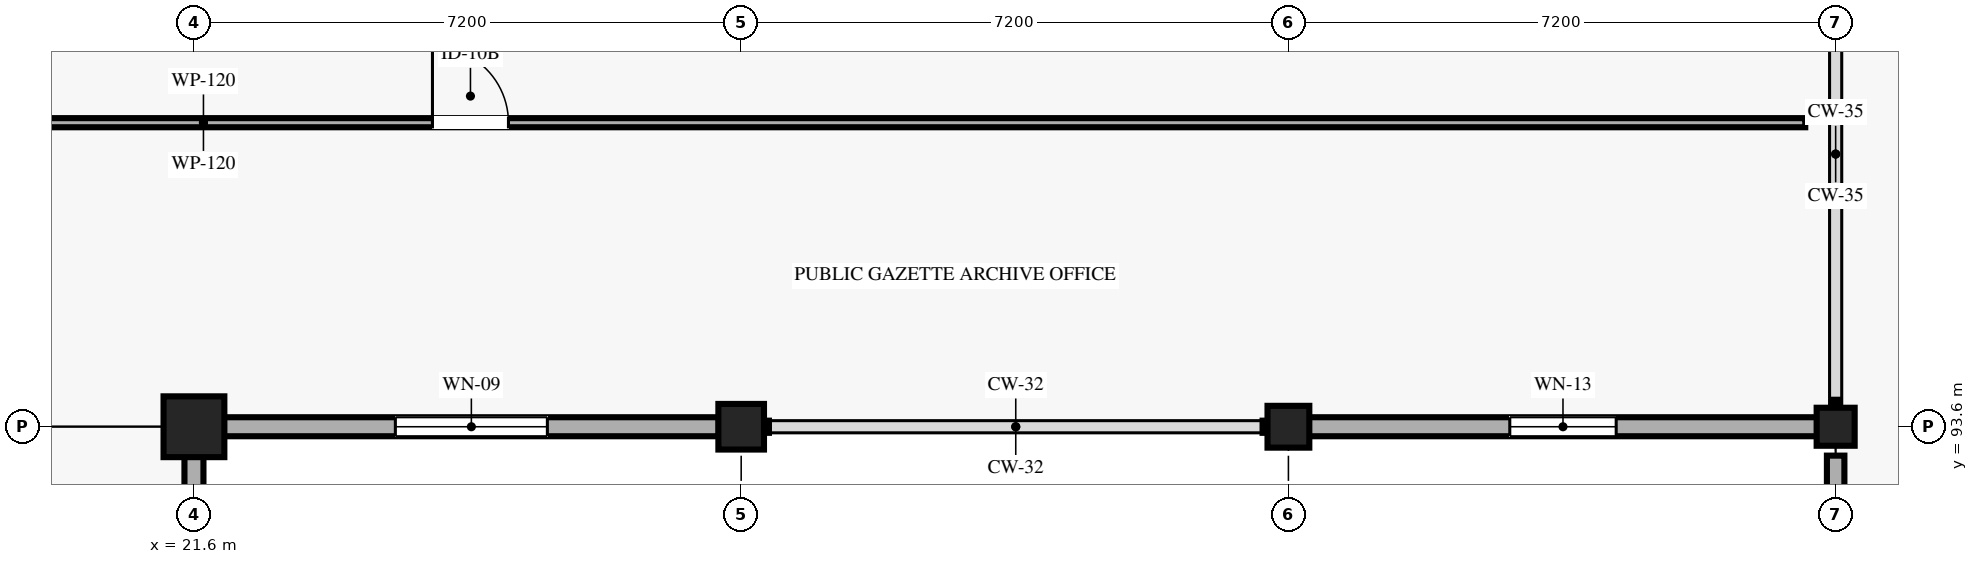
"""IFC4 building model, lengths in metres.
Left out: names, types, materials, properties, quantities, classifications, styles, units other than length and angle.
Written with IfcOpenShell. Run it as: python <this file> out.ifc"""

import sys

from ifc_helpers import new_model, si_unit, direction, frame, frame_2d, origin, origin_2d, place, context, subcontext, project, spatial, rectangle, extrude, element, fill, save


model = new_model("IFC4")
c1 = context("Model", 3, precision=1e-05, world=origin(), true_north=direction((0.0, 1.0)))
c2 = subcontext(c1, "Body", "Model", "MODEL_VIEW")
j1 = project(units=[si_unit("LENGTHUNIT", "METRE"), si_unit("PLANEANGLEUNIT", "RADIAN")], contexts=[c1])
p1 = place(None, origin())
s1 = spatial("IfcSite", under=j1, at=p1, CompositionType="ELEMENT")
p2 = place(p1, origin())
s2 = spatial("IfcBuilding", under=s1, at=p2, CompositionType="ELEMENT")
p3 = place(p2, frame((0.0, 0.0, 9.45)))
s3 = spatial("IfcBuildingStorey", under=s2, at=p3, CompositionType="ELEMENT", Elevation=9.45)
p4 = place(p3, frame((21.6, 93.6, 0.0), z_axis=(0.0, 0.0, 1.0), x_axis=(1.0, 0.0, 0.0)))
e1 = element("IfcColumn", 1, at=p4, inside=s3, PredefinedType="COLUMN", context=c2, shape_type="SweptSolid", body=[
    extrude(rectangle(XDim=0.8, YDim=0.8, at=origin_2d()), origin(), (0.0, 0.0, 1.0), 4.05),
])
p5 = place(p3, frame((28.8, 93.6, 0.0), z_axis=(0.0, 0.0, 1.0), x_axis=(1.0, 0.0, 0.0)))
e2 = element("IfcColumn", 2, at=p5, inside=s3, PredefinedType="COLUMN", context=c2, shape_type="SweptSolid", body=[
    extrude(rectangle(XDim=0.6, YDim=0.6, at=origin_2d()), origin(), (0.0, 0.0, 1.0), 4.05),
])
p6 = place(p3, frame((36.0, 93.6, 0.0), z_axis=(0.0, 0.0, 1.0), x_axis=(1.0, 0.0, 0.0)))
e3 = element("IfcColumn", 3, at=p6, inside=s3, PredefinedType="COLUMN", context=c2, shape_type="SweptSolid", body=[
    extrude(rectangle(XDim=0.55, YDim=0.55, at=origin_2d()), origin(), (0.0, 0.0, 1.0), 4.05),
])
p7 = place(p3, frame((43.2, 93.6, 0.0), z_axis=(0.0, 0.0, 1.0), x_axis=(1.0, 0.0, 0.0)))
e4 = element("IfcColumn", 4, at=p7, inside=s3, PredefinedType="COLUMN", context=c2, shape_type="SweptSolid", body=[
    extrude(rectangle(XDim=0.5, YDim=0.5, at=origin_2d()), origin(), (0.0, 0.0, 1.0), 4.05),
])
p8 = place(p3, frame((21.995, 93.6, 0.0), z_axis=(0.0, 0.0, 1.0), x_axis=(1.0, 0.0, 0.0)))
e5 = element("IfcWall", 5, at=p8, inside=s3, PredefinedType="SOLIDWALL", context=c2, shape_type="SweptSolid", body=[
    extrude(rectangle(XDim=6.51, YDim=0.25, at=frame_2d((3.255, 0.0))), origin(), (0.0, 0.0, 1.0), 3.195),
])
p9 = place(p8, frame((2.255, 0.0, 0.85)))
e6 = element("IfcOpeningElement", 6, at=p9, cuts=e5, PredefinedType="OPENING", context=c2, shape_type="SweptSolid", body=[
    extrude(rectangle(XDim=2.0, YDim=1.65, at=frame_2d((1.0, 0.825))), frame((0.0, 0.135, 0.0), z_axis=(0.0, -1.0, 0.0), x_axis=(1.0, 0.0, 0.0)), (0.0, 0.0, 1.0), 0.27),
])
p10 = place(p3, frame((36.27, 93.6, 0.0), z_axis=(0.0, 0.0, 1.0), x_axis=(1.0, 0.0, 0.0)))
e7 = element("IfcWall", 7, at=p10, inside=s3, PredefinedType="SOLIDWALL", context=c2, shape_type="SweptSolid", body=[
    extrude(rectangle(XDim=6.685, YDim=0.25, at=frame_2d((3.343, 0.0))), origin(), (0.0, 0.0, 1.0), 3.195),
])
p11 = place(p10, frame((2.643, 0.0, 0.85)))
e8 = element("IfcOpeningElement", 8, at=p11, cuts=e7, PredefinedType="OPENING", context=c2, shape_type="SweptSolid", body=[
    extrude(rectangle(XDim=1.4, YDim=1.6, at=frame_2d((0.7, 0.8))), frame((0.0, 0.135, 0.0), z_axis=(0.0, -1.0, 0.0), x_axis=(1.0, 0.0, 0.0)), (0.0, 0.0, 1.0), 0.27),
])
p12 = place(p3, frame((21.6, 86.795, 0.0), z_axis=(0.0, 0.0, 1.0), x_axis=(0.0, 1.0, 0.0)))
e9 = element("IfcWall", 9, at=p12, inside=s3, PredefinedType="SOLIDWALL", context=c2, shape_type="SweptSolid", body=[
    extrude(rectangle(XDim=6.41, YDim=0.25, at=frame_2d((3.205, 0.0))), origin(), (0.0, 0.0, 1.0), 3.195),
])
p13 = place(p12, frame((2.105, 0.0, 0.85)))
e10 = element("IfcOpeningElement", 10, at=p13, cuts=e9, PredefinedType="OPENING", context=c2, shape_type="SweptSolid", body=[
    extrude(rectangle(XDim=2.2, YDim=1.7, at=frame_2d((1.1, 0.85))), frame((0.0, 0.135, 0.0), z_axis=(0.0, -1.0, 0.0), x_axis=(1.0, 0.0, 0.0)), (0.0, 0.0, 1.0), 0.27),
])
p14 = place(p3, frame((43.2, 86.78, 0.0), z_axis=(0.0, 0.0, 1.0), x_axis=(0.0, 1.0, 0.0)))
e11 = element("IfcWall", 11, at=p14, inside=s3, PredefinedType="SOLIDWALL", context=c2, shape_type="SweptSolid", body=[
    extrude(rectangle(XDim=6.44, YDim=0.23, at=frame_2d((3.22, 0.0))), origin(), (0.0, 0.0, 1.0), 0.705),
])
p15 = place(p3, frame((0.65, 97.6, 0.0), z_axis=(0.0, 0.0, 1.0), x_axis=(1.0, 0.0, 0.0)))
e12 = element("IfcWall", 12, at=p15, inside=s3, PredefinedType="PARTITIONING", context=c2, shape_type="SweptSolid", body=[
    extrude(rectangle(XDim=42.15, YDim=0.12, at=frame_2d((21.075, 0.0))), origin(), (0.0, 0.0, 1.0), 3.81),
])
p16 = place(p15, frame((24.088, 0.0, 0.0)))
e13 = element("IfcOpeningElement", 13, at=p16, cuts=e12, PredefinedType="OPENING", context=c2, shape_type="SweptSolid", body=[
    extrude(rectangle(XDim=1.0, YDim=2.1, at=frame_2d((0.5, 1.05))), frame((0.0, 0.07, 0.0), z_axis=(0.0, -1.0, 0.0), x_axis=(1.0, 0.0, 0.0)), (0.0, 0.0, 1.0), 0.14),
])
p17 = place(p9, origin())
e14 = element("IfcWindow", 14, at=p17, inside=s3, PartitioningType="SINGLE_PANEL", PredefinedType="WINDOW", context=c2, shape_type="SweptSolid", body=[
    extrude(rectangle(XDim=2.0, YDim=1.65, at=frame_2d((1.0, 0.825))), frame((0.0, 0.03, 0.0), z_axis=(0.0, -1.0, 0.0), x_axis=(1.0, 0.0, 0.0)), (0.0, 0.0, 1.0), 0.06),
])
fill(e6, e14)
p18 = place(p11, origin())
e15 = element("IfcWindow", 15, at=p18, inside=s3, PartitioningType="SINGLE_PANEL", PredefinedType="WINDOW", context=c2, shape_type="SweptSolid", body=[
    extrude(rectangle(XDim=1.4, YDim=1.6, at=frame_2d((0.7, 0.8))), frame((0.0, 0.03, 0.0), z_axis=(0.0, -1.0, 0.0), x_axis=(1.0, 0.0, 0.0)), (0.0, 0.0, 1.0), 0.06),
])
fill(e8, e15)
p19 = place(p16, origin())
e16 = element("IfcDoor", 16, at=p19, inside=s3, OperationType="SINGLE_SWING_LEFT", PredefinedType="DOOR", context=c2, shape_type="SweptSolid", body=[
    extrude(rectangle(XDim=1.0, YDim=2.1, at=frame_2d((0.5, 1.05))), frame((0.0, 0.025, 0.0), z_axis=(0.0, -1.0, 0.0), x_axis=(1.0, 0.0, 0.0)), (0.0, 0.0, 1.0), 0.05),
])
fill(e13, e16)
save(model, sys.argv[1])
